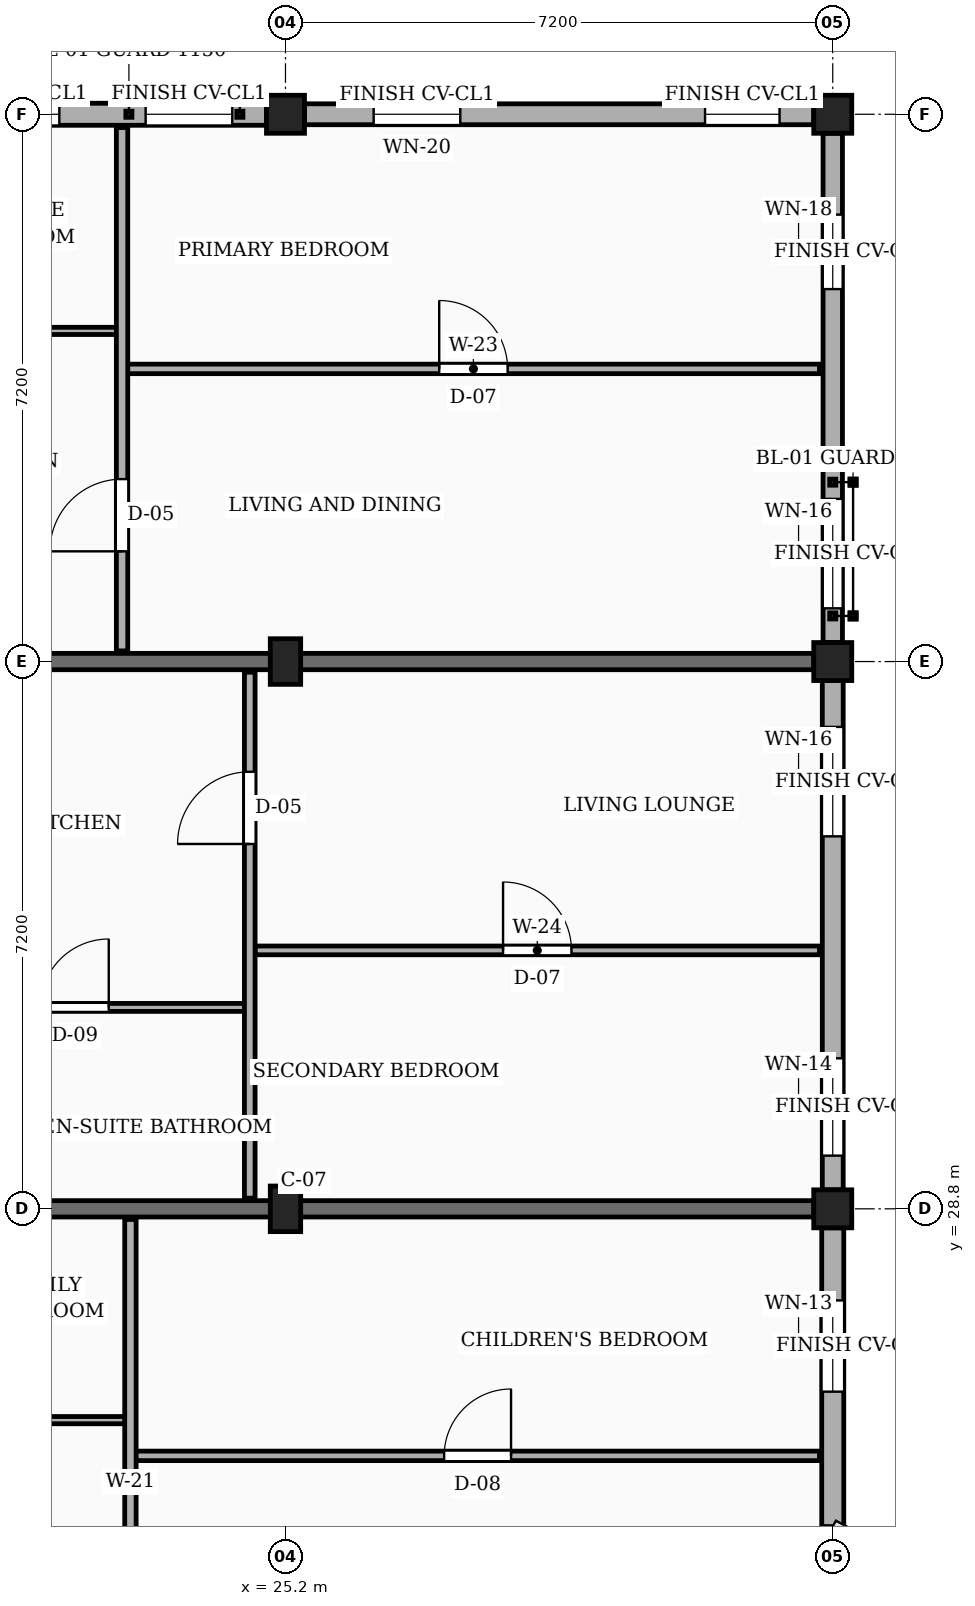
"""IFC4 building model, lengths in metres.
Left out: names, types, materials, properties, quantities, classifications, styles, units other than length and angle.
Written with IfcOpenShell. Run it as: python <this file> out.ifc"""

import sys

from ifc_helpers import new_model, si_unit, direction, frame, frame_2d, origin, origin_2d, place, context, subcontext, project, spatial, rectangle, extrude, element, fill, save


model = new_model("IFC4")
c1 = context("Model", 3, precision=1e-05, world=origin(), true_north=direction((0.0, 1.0)))
c2 = subcontext(c1, "Body", "Model", "MODEL_VIEW")
j1 = project(units=[si_unit("LENGTHUNIT", "METRE"), si_unit("PLANEANGLEUNIT", "RADIAN")], contexts=[c1])
p1 = place(None, origin())
s1 = spatial("IfcSite", under=j1, at=p1, CompositionType="ELEMENT")
p2 = place(p1, origin())
s2 = spatial("IfcBuilding", under=s1, at=p2, CompositionType="ELEMENT")
p3 = place(p2, frame((0.0, 0.0, 26.55)))
s3 = spatial("IfcBuildingStorey", under=s2, at=p3, CompositionType="ELEMENT", Elevation=26.55)
for number, where, z_axis, x_axis in (
    (1, (25.2, 28.8, 0.0), (0.0, 0.0, 1.0), (1.0, 0.0, 0.0)),
    (2, (25.2, 36.0, 0.0), (0.0, 0.0, 1.0), (1.0, 0.0, 0.0)),
):
    element("IfcColumn", number, at=place(p3, frame(where, z_axis=z_axis, x_axis=x_axis)), inside=s3, PredefinedType="COLUMN", context=c2, shape_type="SweptSolid", body=[
        extrude(rectangle(XDim=0.4, YDim=0.6, at=origin_2d()), origin(), (0.0, 0.0, 1.0), 3.15),
    ])
for number, where, z_axis, x_axis in (
    (3, (25.2, 43.2, 0.0), (0.0, 0.0, 1.0), (1.0, 0.0, 0.0)),
    (4, (32.4, 28.8, 0.0), (0.0, 0.0, 1.0), (1.0, 0.0, 0.0)),
    (5, (32.4, 36.0, 0.0), (0.0, 0.0, 1.0), (1.0, 0.0, 0.0)),
    (6, (32.4, 43.2, 0.0), (0.0, 0.0, 1.0), (1.0, 0.0, 0.0)),
):
    element("IfcColumn", number, at=place(p3, frame(where, z_axis=z_axis, x_axis=x_axis)), inside=s3, PredefinedType="COLUMN", context=c2, shape_type="SweptSolid", body=[
        extrude(rectangle(XDim=0.5, YDim=0.5, at=origin_2d()), origin(), (0.0, 0.0, 1.0), 3.15),
    ])
for number, where, z_axis, x_axis in (
    (7, (20.1, 28.8, 0.0), (0.0, 0.0, 1.0), (1.0, 0.0, 0.0)),
    (8, (20.1, 36.0, 0.0), (0.0, 0.0, 1.0), (1.0, 0.0, 0.0)),
):
    element("IfcWall", number, at=place(p3, frame(where, z_axis=z_axis, x_axis=x_axis)), inside=s3, PredefinedType="SOLIDWALL", context=c2, shape_type="SweptSolid", body=[
        extrude(rectangle(XDim=12.05, YDim=0.215, at=frame_2d((6.025, 0.0))), origin(), (0.0, 0.0, 1.0), 2.17),
    ])
p4 = place(p3, frame((32.4, 24.62, 0.0), z_axis=(0.0, 0.0, 1.0), x_axis=(0.0, 1.0, 0.0)))
e9 = element("IfcWall", 9, at=p4, inside=s3, PredefinedType="SOLIDWALL", context=c2, shape_type="SweptSolid", body=[
    extrude(rectangle(XDim=3.93, YDim=0.29, at=frame_2d((1.965, 0.0))), origin(), (0.0, 0.0, 1.0), 2.44),
])
p5 = place(p4, frame((1.775, 0.0, 0.78)))
e10 = element("IfcOpeningElement", 10, at=p5, cuts=e9, PredefinedType="OPENING", context=c2, shape_type="SweptSolid", body=[
    extrude(rectangle(XDim=1.2, YDim=1.26, at=frame_2d((0.6, 0.63))), frame((0.0, 0.155, 0.0), z_axis=(0.0, -1.0, 0.0), x_axis=(1.0, 0.0, 0.0)), (0.0, 0.0, 1.0), 0.31),
])
p6 = place(p3, frame((32.4, 29.05, 0.0), z_axis=(0.0, 0.0, 1.0), x_axis=(0.0, 1.0, 0.0)))
e11 = element("IfcWall", 11, at=p6, inside=s3, PredefinedType="SOLIDWALL", context=c2, shape_type="SweptSolid", body=[
    extrude(rectangle(XDim=6.7, YDim=0.275, at=frame_2d((3.35, 0.0))), origin(), (0.0, 0.0, 1.0), 2.44),
])
p7 = place(p6, frame((0.45, 0.0, 0.78)))
e12 = element("IfcOpeningElement", 12, at=p7, cuts=e11, PredefinedType="OPENING", context=c2, shape_type="SweptSolid", body=[
    extrude(rectangle(XDim=1.28, YDim=1.26, at=frame_2d((0.64, 0.63))), frame((0.0, 0.147, 0.0), z_axis=(0.0, -1.0, 0.0), x_axis=(1.0, 0.0, 0.0)), (0.0, 0.0, 1.0), 0.295),
])
p8 = place(p6, frame((4.65, 0.0, 0.78)))
e13 = element("IfcOpeningElement", 13, at=p8, cuts=e11, PredefinedType="OPENING", context=c2, shape_type="SweptSolid", body=[
    extrude(rectangle(XDim=1.44, YDim=1.26, at=frame_2d((0.72, 0.63))), frame((0.0, 0.147, 0.0), z_axis=(0.0, -1.0, 0.0), x_axis=(1.0, 0.0, 0.0)), (0.0, 0.0, 1.0), 0.295),
])
p9 = place(p3, frame((32.4, 36.25, 0.0), z_axis=(0.0, 0.0, 1.0), x_axis=(0.0, 1.0, 0.0)))
e14 = element("IfcWall", 14, at=p9, inside=s3, PredefinedType="SOLIDWALL", context=c2, shape_type="SweptSolid", body=[
    extrude(rectangle(XDim=6.7, YDim=0.255, at=frame_2d((3.35, 0.0))), origin(), (0.0, 0.0, 1.0), 2.44),
])
p10 = place(p9, frame((0.45, 0.0, 0.78)))
e15 = element("IfcOpeningElement", 15, at=p10, cuts=e14, PredefinedType="OPENING", context=c2, shape_type="SweptSolid", body=[
    extrude(rectangle(XDim=1.44, YDim=1.26, at=frame_2d((0.72, 0.63))), frame((0.0, 0.137, 0.0), z_axis=(0.0, -1.0, 0.0), x_axis=(1.0, 0.0, 0.0)), (0.0, 0.0, 1.0), 0.275),
])
p11 = place(p9, frame((4.65, 0.0, 0.78)))
e16 = element("IfcOpeningElement", 16, at=p11, cuts=e14, PredefinedType="OPENING", context=c2, shape_type="SweptSolid", body=[
    extrude(rectangle(XDim=0.98, YDim=1.36, at=frame_2d((0.49, 0.68))), frame((0.0, 0.137, 0.0), z_axis=(0.0, -1.0, 0.0), x_axis=(1.0, 0.0, 0.0)), (0.0, 0.0, 1.0), 0.275),
])
p12 = place(p3, frame((32.15, 43.2, 0.0), z_axis=(0.0, 0.0, 1.0), x_axis=(-1.0, 0.0, 0.0)))
e17 = element("IfcWall", 17, at=p12, inside=s3, PredefinedType="SOLIDWALL", context=c2, shape_type="SweptSolid", body=[
    extrude(rectangle(XDim=6.7, YDim=0.275, at=frame_2d((3.35, 0.0))), origin(), (0.0, 0.0, 1.0), 2.44),
])
p13 = place(p12, frame((0.45, 0.0, 0.78)))
e18 = element("IfcOpeningElement", 18, at=p13, cuts=e17, PredefinedType="OPENING", context=c2, shape_type="SweptSolid", body=[
    extrude(rectangle(XDim=0.98, YDim=1.36, at=frame_2d((0.49, 0.68))), frame((0.0, 0.147, 0.0), z_axis=(0.0, -1.0, 0.0), x_axis=(1.0, 0.0, 0.0)), (0.0, 0.0, 1.0), 0.295),
])
p14 = place(p12, frame((4.65, 0.0, 0.78)))
e19 = element("IfcOpeningElement", 19, at=p14, cuts=e17, PredefinedType="OPENING", context=c2, shape_type="SweptSolid", body=[
    extrude(rectangle(XDim=1.14, YDim=1.36, at=frame_2d((0.57, 0.68))), frame((0.0, 0.147, 0.0), z_axis=(0.0, -1.0, 0.0), x_axis=(1.0, 0.0, 0.0)), (0.0, 0.0, 1.0), 0.295),
])
p15 = place(p3, frame((24.95, 43.2, 0.0), z_axis=(0.0, 0.0, 1.0), x_axis=(-1.0, 0.0, 0.0)))
e20 = element("IfcWall", 20, at=p15, inside=s3, PredefinedType="SOLIDWALL", context=c2, shape_type="SweptSolid", body=[
    extrude(rectangle(XDim=6.7, YDim=0.29, at=frame_2d((3.35, 0.0))), origin(), (0.0, 0.0, 1.0), 2.44),
])
p16 = place(p15, frame((0.45, 0.0, 0.78)))
e21 = element("IfcOpeningElement", 21, at=p16, cuts=e20, PredefinedType="OPENING", context=c2, shape_type="SweptSolid", body=[
    extrude(rectangle(XDim=1.14, YDim=1.36, at=frame_2d((0.57, 0.68))), frame((0.0, 0.155, 0.0), z_axis=(0.0, -1.0, 0.0), x_axis=(1.0, 0.0, 0.0)), (0.0, 0.0, 1.0), 0.31),
])
p17 = place(p15, frame((2.725, 0.0, 0.78)))
e22 = element("IfcOpeningElement", 22, at=p17, cuts=e20, PredefinedType="OPENING", context=c2, shape_type="SweptSolid", body=[
    extrude(rectangle(XDim=1.3, YDim=1.36, at=frame_2d((0.65, 0.68))), frame((0.0, 0.155, 0.0), z_axis=(0.0, -1.0, 0.0), x_axis=(1.0, 0.0, 0.0)), (0.0, 0.0, 1.0), 0.31),
])
p18 = place(p15, frame((5.185, 0.0, 0.78)))
e23 = element("IfcOpeningElement", 23, at=p18, cuts=e20, PredefinedType="OPENING", context=c2, shape_type="SweptSolid", body=[
    extrude(rectangle(XDim=1.04, YDim=1.26, at=frame_2d((0.52, 0.63))), frame((0.0, 0.155, 0.0), z_axis=(0.0, -1.0, 0.0), x_axis=(1.0, 0.0, 0.0)), (0.0, 0.0, 1.0), 0.31),
])
p19 = place(p3, frame((23.23, 25.55, 0.0), z_axis=(0.0, 0.0, 1.0), x_axis=(1.0, 0.0, 0.0)))
e24 = element("IfcWall", 24, at=p19, inside=s3, PredefinedType="PARTITIONING", context=c2, shape_type="SweptSolid", body=[
    extrude(rectangle(XDim=8.995, YDim=0.125, at=frame_2d((4.498, 0.0))), origin(), (0.0, 0.0, 1.0), 2.305),
])
p20 = place(p19, frame((4.058, 0.0, 0.0)))
e25 = element("IfcOpeningElement", 25, at=p20, cuts=e24, PredefinedType="OPENING", context=c2, shape_type="SweptSolid", body=[
    extrude(rectangle(XDim=0.88, YDim=2.08, at=frame_2d((0.44, 1.04))), frame((0.0, 0.073, 0.0), z_axis=(0.0, -1.0, 0.0), x_axis=(1.0, 0.0, 0.0)), (0.0, 0.0, 1.0), 0.145),
])
p21 = place(p3, frame((20.19, 26.02, 0.0), z_axis=(0.0, 0.0, 1.0), x_axis=(1.0, 0.0, 0.0)))
e26 = element("IfcWall", 26, at=p21, inside=s3, PredefinedType="PARTITIONING", context=c2, shape_type="SweptSolid", body=[
    extrude(rectangle(XDim=2.9, YDim=0.095, at=frame_2d((1.45, 0.0))), origin(), (0.0, 0.0, 1.0), 2.305),
])
p22 = place(p21, frame((1.015, 0.0, 0.0)))
e27 = element("IfcOpeningElement", 27, at=p22, cuts=e26, PredefinedType="OPENING", context=c2, shape_type="SweptSolid", body=[
    extrude(rectangle(XDim=0.87, YDim=2.05, at=frame_2d((0.435, 1.025))), frame((0.0, 0.058, 0.0), z_axis=(0.0, -1.0, 0.0), x_axis=(1.0, 0.0, 0.0)), (0.0, 0.0, 1.0), 0.115),
])
p23 = place(p3, frame((23.16, 21.74, 0.0), z_axis=(0.0, 0.0, 1.0), x_axis=(0.0, 1.0, 0.0)))
e28 = element("IfcWall", 28, at=p23, inside=s3, PredefinedType="PARTITIONING", context=c2, shape_type="SweptSolid", body=[
    extrude(rectangle(XDim=6.92, YDim=0.15, at=frame_2d((3.46, 0.0))), origin(), (0.0, 0.0, 1.0), 2.305),
])
p24 = place(p23, frame((1.31, 0.0, 0.0)))
e29 = element("IfcOpeningElement", 29, at=p24, cuts=e28, PredefinedType="OPENING", context=c2, shape_type="SweptSolid", body=[
    extrude(rectangle(XDim=0.92, YDim=2.1, at=frame_2d((0.46, 1.05))), frame((0.0, 0.085, 0.0), z_axis=(0.0, -1.0, 0.0), x_axis=(1.0, 0.0, 0.0)), (0.0, 0.0, 1.0), 0.17),
])
p25 = place(p3, frame((24.8, 32.2, 0.0), z_axis=(0.0, 0.0, 1.0), x_axis=(1.0, 0.0, 0.0)))
e30 = element("IfcWall", 30, at=p25, inside=s3, PredefinedType="PARTITIONING", context=c2, shape_type="SweptSolid", body=[
    extrude(rectangle(XDim=7.425, YDim=0.115, at=frame_2d((3.712, 0.0))), origin(), (0.0, 0.0, 1.0), 2.305),
])
p26 = place(p25, frame((3.262, 0.0, 0.0)))
e31 = element("IfcOpeningElement", 31, at=p26, cuts=e30, PredefinedType="OPENING", context=c2, shape_type="SweptSolid", body=[
    extrude(rectangle(XDim=0.9, YDim=2.1, at=frame_2d((0.45, 1.05))), frame((0.0, 0.067, 0.0), z_axis=(0.0, -1.0, 0.0), x_axis=(1.0, 0.0, 0.0)), (0.0, 0.0, 1.0), 0.135),
])
p27 = place(p3, frame((20.19, 31.45, 0.0), z_axis=(0.0, 0.0, 1.0), x_axis=(1.0, 0.0, 0.0)))
e32 = element("IfcWall", 32, at=p27, inside=s3, PredefinedType="PARTITIONING", context=c2, shape_type="SweptSolid", body=[
    extrude(rectangle(XDim=4.47, YDim=0.105, at=frame_2d((2.235, 0.0))), origin(), (0.0, 0.0, 1.0), 2.305),
])
p28 = place(p27, frame((1.785, 0.0, 0.0)))
e33 = element("IfcOpeningElement", 33, at=p28, cuts=e32, PredefinedType="OPENING", context=c2, shape_type="SweptSolid", body=[
    extrude(rectangle(XDim=0.9, YDim=2.05, at=frame_2d((0.45, 1.025))), frame((0.0, 0.062, 0.0), z_axis=(0.0, -1.0, 0.0), x_axis=(1.0, 0.0, 0.0)), (0.0, 0.0, 1.0), 0.125),
])
p29 = place(p3, frame((24.73, 28.94, 0.0), z_axis=(0.0, 0.0, 1.0), x_axis=(0.0, 1.0, 0.0)))
e34 = element("IfcWall", 34, at=p29, inside=s3, PredefinedType="PARTITIONING", context=c2, shape_type="SweptSolid", body=[
    extrude(rectangle(XDim=6.92, YDim=0.14, at=frame_2d((3.46, 0.0))), origin(), (0.0, 0.0, 1.0), 2.305),
])
p30 = place(p29, frame((4.66, 0.0, 0.0)))
e35 = element("IfcOpeningElement", 35, at=p30, cuts=e34, PredefinedType="OPENING", context=c2, shape_type="SweptSolid", body=[
    extrude(rectangle(XDim=0.95, YDim=2.1, at=frame_2d((0.475, 1.05))), frame((0.0, 0.08, 0.0), z_axis=(0.0, -1.0, 0.0), x_axis=(1.0, 0.0, 0.0)), (0.0, 0.0, 1.0), 0.16),
])
p31 = place(p3, frame((23.12, 39.85, 0.0), z_axis=(0.0, 0.0, 1.0), x_axis=(1.0, 0.0, 0.0)))
e36 = element("IfcWall", 36, at=p31, inside=s3, PredefinedType="PARTITIONING", context=c2, shape_type="SweptSolid", body=[
    extrude(rectangle(XDim=9.105, YDim=0.125, at=frame_2d((4.552, 0.0))), origin(), (0.0, 0.0, 1.0), 2.305),
])
p32 = place(p31, frame((4.103, 0.0, 0.0)))
e37 = element("IfcOpeningElement", 37, at=p32, cuts=e36, PredefinedType="OPENING", context=c2, shape_type="SweptSolid", body=[
    extrude(rectangle(XDim=0.9, YDim=2.1, at=frame_2d((0.45, 1.05))), frame((0.0, 0.073, 0.0), z_axis=(0.0, -1.0, 0.0), x_axis=(1.0, 0.0, 0.0)), (0.0, 0.0, 1.0), 0.145),
])
p33 = place(p3, frame((20.19, 40.35, 0.0), z_axis=(0.0, 0.0, 1.0), x_axis=(1.0, 0.0, 0.0)))
e38 = element("IfcWall", 38, at=p33, inside=s3, PredefinedType="PARTITIONING", context=c2, shape_type="SweptSolid", body=[
    extrude(rectangle(XDim=2.79, YDim=0.095, at=frame_2d((1.395, 0.0))), origin(), (0.0, 0.0, 1.0), 2.305),
])
p34 = place(p33, frame((0.945, 0.0, 0.0)))
e39 = element("IfcOpeningElement", 39, at=p34, cuts=e38, PredefinedType="OPENING", context=c2, shape_type="SweptSolid", body=[
    extrude(rectangle(XDim=0.9, YDim=2.05, at=frame_2d((0.45, 1.025))), frame((0.0, 0.058, 0.0), z_axis=(0.0, -1.0, 0.0), x_axis=(1.0, 0.0, 0.0)), (0.0, 0.0, 1.0), 0.115),
])
p35 = place(p3, frame((23.05, 36.14, 0.0), z_axis=(0.0, 0.0, 1.0), x_axis=(0.0, 1.0, 0.0)))
e40 = element("IfcWall", 40, at=p35, inside=s3, PredefinedType="PARTITIONING", context=c2, shape_type="SweptSolid", body=[
    extrude(rectangle(XDim=6.885, YDim=0.15, at=frame_2d((3.442, 0.0))), origin(), (0.0, 0.0, 1.0), 2.305),
])
p36 = place(p35, frame((1.31, 0.0, 0.0)))
e41 = element("IfcOpeningElement", 41, at=p36, cuts=e40, PredefinedType="OPENING", context=c2, shape_type="SweptSolid", body=[
    extrude(rectangle(XDim=0.95, YDim=2.1, at=frame_2d((0.475, 1.05))), frame((0.0, 0.085, 0.0), z_axis=(0.0, -1.0, 0.0), x_axis=(1.0, 0.0, 0.0)), (0.0, 0.0, 1.0), 0.17),
])
p37 = place(p5, origin())
e42 = element("IfcWindow", 42, at=p37, inside=s3, PartitioningType="SINGLE_PANEL", PredefinedType="WINDOW", context=c2, shape_type="SweptSolid", body=[
    extrude(rectangle(XDim=1.2, YDim=1.26, at=frame_2d((0.6, 0.63))), frame((0.0, 0.03, 0.0), z_axis=(0.0, -1.0, 0.0), x_axis=(1.0, 0.0, 0.0)), (0.0, 0.0, 1.0), 0.06),
])
fill(e10, e42)
p38 = place(p7, origin())
e43 = element("IfcWindow", 43, at=p38, inside=s3, PartitioningType="SINGLE_PANEL", PredefinedType="WINDOW", context=c2, shape_type="SweptSolid", body=[
    extrude(rectangle(XDim=1.28, YDim=1.26, at=frame_2d((0.64, 0.63))), frame((0.0, 0.03, 0.0), z_axis=(0.0, -1.0, 0.0), x_axis=(1.0, 0.0, 0.0)), (0.0, 0.0, 1.0), 0.06),
])
fill(e12, e43)
p39 = place(p8, origin())
e44 = element("IfcWindow", 44, at=p39, inside=s3, PartitioningType="SINGLE_PANEL", PredefinedType="WINDOW", context=c2, shape_type="SweptSolid", body=[
    extrude(rectangle(XDim=1.44, YDim=1.26, at=frame_2d((0.72, 0.63))), frame((0.0, 0.03, 0.0), z_axis=(0.0, -1.0, 0.0), x_axis=(1.0, 0.0, 0.0)), (0.0, 0.0, 1.0), 0.06),
])
fill(e13, e44)
p40 = place(p10, origin())
e45 = element("IfcWindow", 45, at=p40, inside=s3, PartitioningType="SINGLE_PANEL", PredefinedType="WINDOW", context=c2, shape_type="SweptSolid", body=[
    extrude(rectangle(XDim=1.44, YDim=1.26, at=frame_2d((0.72, 0.63))), frame((0.0, 0.03, 0.0), z_axis=(0.0, -1.0, 0.0), x_axis=(1.0, 0.0, 0.0)), (0.0, 0.0, 1.0), 0.06),
])
fill(e15, e45)
p41 = place(p11, origin())
e46 = element("IfcWindow", 46, at=p41, inside=s3, PartitioningType="SINGLE_PANEL", PredefinedType="WINDOW", context=c2, shape_type="SweptSolid", body=[
    extrude(rectangle(XDim=0.98, YDim=1.36, at=frame_2d((0.49, 0.68))), frame((0.0, 0.03, 0.0), z_axis=(0.0, -1.0, 0.0), x_axis=(1.0, 0.0, 0.0)), (0.0, 0.0, 1.0), 0.06),
])
fill(e16, e46)
p42 = place(p13, origin())
e47 = element("IfcWindow", 47, at=p42, inside=s3, PartitioningType="SINGLE_PANEL", PredefinedType="WINDOW", context=c2, shape_type="SweptSolid", body=[
    extrude(rectangle(XDim=0.98, YDim=1.36, at=frame_2d((0.49, 0.68))), frame((0.0, 0.03, 0.0), z_axis=(0.0, -1.0, 0.0), x_axis=(1.0, 0.0, 0.0)), (0.0, 0.0, 1.0), 0.06),
])
fill(e18, e47)
p43 = place(p14, origin())
e48 = element("IfcWindow", 48, at=p43, inside=s3, PartitioningType="SINGLE_PANEL", PredefinedType="WINDOW", context=c2, shape_type="SweptSolid", body=[
    extrude(rectangle(XDim=1.14, YDim=1.36, at=frame_2d((0.57, 0.68))), frame((0.0, 0.03, 0.0), z_axis=(0.0, -1.0, 0.0), x_axis=(1.0, 0.0, 0.0)), (0.0, 0.0, 1.0), 0.06),
])
fill(e19, e48)
p44 = place(p16, origin())
e49 = element("IfcWindow", 49, at=p44, inside=s3, PartitioningType="SINGLE_PANEL", PredefinedType="WINDOW", context=c2, shape_type="SweptSolid", body=[
    extrude(rectangle(XDim=1.14, YDim=1.36, at=frame_2d((0.57, 0.68))), frame((0.0, 0.03, 0.0), z_axis=(0.0, -1.0, 0.0), x_axis=(1.0, 0.0, 0.0)), (0.0, 0.0, 1.0), 0.06),
])
fill(e21, e49)
p45 = place(p17, origin())
e50 = element("IfcWindow", 50, at=p45, inside=s3, PartitioningType="SINGLE_PANEL", PredefinedType="WINDOW", context=c2, shape_type="SweptSolid", body=[
    extrude(rectangle(XDim=1.3, YDim=1.36, at=frame_2d((0.65, 0.68))), frame((0.0, 0.03, 0.0), z_axis=(0.0, -1.0, 0.0), x_axis=(1.0, 0.0, 0.0)), (0.0, 0.0, 1.0), 0.06),
])
fill(e22, e50)
p46 = place(p20, origin())
e51 = element("IfcDoor", 51, at=p46, inside=s3, OperationType="SINGLE_SWING_RIGHT", PredefinedType="DOOR", context=c2, shape_type="SweptSolid", body=[
    extrude(rectangle(XDim=0.88, YDim=2.08, at=frame_2d((0.44, 1.04))), frame((0.0, 0.025, 0.0), z_axis=(0.0, -1.0, 0.0), x_axis=(1.0, 0.0, 0.0)), (0.0, 0.0, 1.0), 0.05),
])
fill(e25, e51)
p47 = place(p26, origin())
e52 = element("IfcDoor", 52, at=p47, inside=s3, OperationType="SINGLE_SWING_LEFT", PredefinedType="DOOR", context=c2, shape_type="SweptSolid", body=[
    extrude(rectangle(XDim=0.9, YDim=2.1, at=frame_2d((0.45, 1.05))), frame((0.0, 0.025, 0.0), z_axis=(0.0, -1.0, 0.0), x_axis=(1.0, 0.0, 0.0)), (0.0, 0.0, 1.0), 0.05),
])
fill(e31, e52)
p48 = place(p28, origin())
e53 = element("IfcDoor", 53, at=p48, inside=s3, OperationType="SINGLE_SWING_RIGHT", PredefinedType="DOOR", context=c2, shape_type="SweptSolid", body=[
    extrude(rectangle(XDim=0.9, YDim=2.05, at=frame_2d((0.45, 1.025))), frame((0.0, 0.025, 0.0), z_axis=(0.0, -1.0, 0.0), x_axis=(1.0, 0.0, 0.0)), (0.0, 0.0, 1.0), 0.05),
])
fill(e33, e53)
p49 = place(p30, origin())
e54 = element("IfcDoor", 54, at=p49, inside=s3, OperationType="SINGLE_SWING_LEFT", PredefinedType="DOOR", context=c2, shape_type="SweptSolid", body=[
    extrude(rectangle(XDim=0.95, YDim=2.1, at=frame_2d((0.475, 1.05))), frame((0.0, 0.025, 0.0), z_axis=(0.0, -1.0, 0.0), x_axis=(1.0, 0.0, 0.0)), (0.0, 0.0, 1.0), 0.05),
])
fill(e35, e54)
p50 = place(p32, origin())
e55 = element("IfcDoor", 55, at=p50, inside=s3, OperationType="SINGLE_SWING_LEFT", PredefinedType="DOOR", context=c2, shape_type="SweptSolid", body=[
    extrude(rectangle(XDim=0.9, YDim=2.1, at=frame_2d((0.45, 1.05))), frame((0.0, 0.025, 0.0), z_axis=(0.0, -1.0, 0.0), x_axis=(1.0, 0.0, 0.0)), (0.0, 0.0, 1.0), 0.05),
])
fill(e37, e55)
p51 = place(p36, origin())
e56 = element("IfcDoor", 56, at=p51, inside=s3, OperationType="SINGLE_SWING_LEFT", PredefinedType="DOOR", context=c2, shape_type="SweptSolid", body=[
    extrude(rectangle(XDim=0.95, YDim=2.1, at=frame_2d((0.475, 1.05))), frame((0.0, 0.025, 0.0), z_axis=(0.0, -1.0, 0.0), x_axis=(1.0, 0.0, 0.0)), (0.0, 0.0, 1.0), 0.05),
])
fill(e41, e56)
save(model, sys.argv[1])
